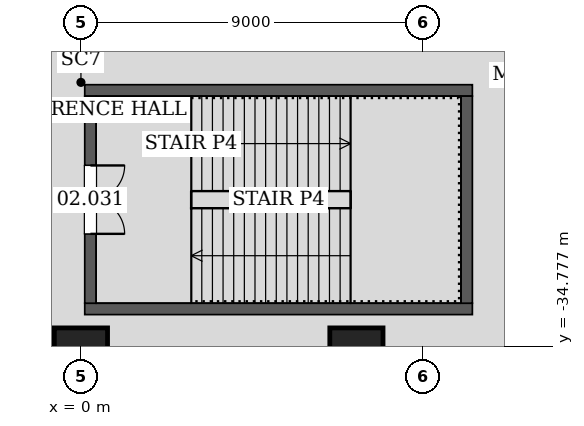
"""IFC4 building model, lengths in metres.
Left out: names, types, materials, properties, quantities, classifications, styles, units other than length and angle.
Written with IfcOpenShell. Run it as: python <this file> out.ifc"""

import sys

from ifc_helpers import new_model, si_unit, direction, frame, frame_2d, origin, origin_2d, place, context, subcontext, project, spatial, rectangle, hollow_rectangle, extrude, element, fill, save


model = new_model("IFC4")
c1 = context("Model", 3, precision=1e-05, world=origin(), true_north=direction((0.0, 1.0)))
c2 = subcontext(c1, "Body", "Model", "MODEL_VIEW")
j1 = project(units=[si_unit("LENGTHUNIT", "METRE"), si_unit("PLANEANGLEUNIT", "RADIAN")], contexts=[c1])
p1 = place(None, origin())
s1 = spatial("IfcSite", under=j1, at=p1, CompositionType="ELEMENT")
p2 = place(p1, origin())
s2 = spatial("IfcBuilding", under=s1, at=p2, CompositionType="ELEMENT")
p3 = place(p2, frame((0.0, 0.0, 13.2)))
s3 = spatial("IfcBuildingStorey", under=s2, at=p3, CompositionType="ELEMENT", Elevation=13.2)
p4 = place(p3, frame((10.754, -25.963, 0.0), z_axis=(-0.011703901791, 0.028288195063, 0.999531288506), x_axis=(-0.92403481427, -0.3823083337, 0.0)))
e1 = element("IfcColumn", 1, at=p4, inside=s3, PredefinedType="COLUMN", context=c2, shape_type="SweptSolid", body=[
    extrude(hollow_rectangle(XDim=2.0, YDim=2.0, WallThickness=0.09, at=origin_2d()), origin(), (0.0, 0.0, 1.0), 5.403),
])
p5 = place(p3, frame((0.0, -26.841, 0.0), z_axis=(0.0, 0.028290132739, 0.999599754096), x_axis=(-1.0, 0.0, 0.0)))
e2 = element("IfcColumn", 2, at=p5, inside=s3, PredefinedType="COLUMN", context=c2, shape_type="SweptSolid", body=[
    extrude(hollow_rectangle(XDim=0.8, YDim=0.8, WallThickness=0.05, at=origin_2d()), origin(), (0.0, 0.0, 1.0), 5.402),
])
for number, where, z_axis, x_axis in (
    (3, (0.0, -35.0, 0.0), (0.0, 0.0, 1.0), (1.0, 0.0, 0.0)),
    (4, (7.249, -35.0, 0.0), (0.0, 0.0, 1.0), (1.0, 0.0, 0.0)),
):
    element("IfcColumn", number, at=place(p3, frame(where, z_axis=z_axis, x_axis=x_axis)), inside=s3, PredefinedType="COLUMN", context=c2, shape_type="SweptSolid", body=[
        extrude(rectangle(XDim=1.4, YDim=1.4, at=origin_2d()), origin(), (0.0, 0.0, 1.0), 5.4),
    ])
for number, where, z_axis, x_axis in (
    (5, (0.1, -33.8, 0.0), (0.0, 0.0, 1.0), (1.0, 0.0, 0.0)),
    (6, (10.3, -28.05, 0.0), (0.0, 0.0, 1.0), (-1.0, 0.0, 0.0)),
):
    element("IfcWall", number, at=place(p3, frame(where, z_axis=z_axis, x_axis=x_axis)), inside=s3, PredefinedType="SOLIDWALL", context=c2, shape_type="SweptSolid", body=[
        extrude(rectangle(XDim=10.2, YDim=0.3, at=frame_2d((5.1, 0.0))), origin(), (0.0, 0.0, 1.0), 5.4),
    ])
p6 = place(p3, frame((0.25, -28.2, 0.0), z_axis=(0.0, 0.0, 1.0), x_axis=(0.0, -1.0, 0.0)))
e7 = element("IfcWall", 7, at=p6, inside=s3, PredefinedType="SOLIDWALL", context=c2, shape_type="SweptSolid", body=[
    extrude(rectangle(XDim=5.45, YDim=0.3, at=frame_2d((2.725, 0.0))), origin(), (0.0, 0.0, 1.0), 5.4),
])
p7 = place(p6, frame((1.825, 0.0, 0.0)))
e8 = element("IfcOpeningElement", 8, at=p7, cuts=e7, PredefinedType="OPENING", context=c2, shape_type="SweptSolid", body=[
    extrude(rectangle(XDim=1.8, YDim=2.1, at=frame_2d((0.9, 1.05))), frame((0.0, 0.16, 0.0), z_axis=(0.0, -1.0, 0.0), x_axis=(1.0, 0.0, 0.0)), (0.0, 0.0, 1.0), 0.32),
])
p8 = place(p3, frame((10.15, -33.65, 0.0), z_axis=(0.0, 0.0, 1.0), x_axis=(0.0, 1.0, 0.0)))
e9 = element("IfcWall", 9, at=p8, inside=s3, PredefinedType="SOLIDWALL", context=c2, shape_type="SweptSolid", body=[
    extrude(rectangle(XDim=5.45, YDim=0.3, at=frame_2d((2.725, 0.0))), origin(), (0.0, 0.0, 1.0), 5.4),
])
p9 = place(p7, origin())
e10 = element("IfcDoor", 10, at=p9, inside=s3, OperationType="DOUBLE_DOOR_SINGLE_SWING", PredefinedType="DOOR", context=c2, shape_type="SweptSolid", body=[
    extrude(rectangle(XDim=1.8, YDim=2.1, at=frame_2d((0.9, 1.05))), frame((0.0, 0.025, 0.0), z_axis=(0.0, -1.0, 0.0), x_axis=(1.0, 0.0, 0.0)), (0.0, 0.0, 1.0), 0.05),
])
fill(e8, e10)
save(model, sys.argv[1])
